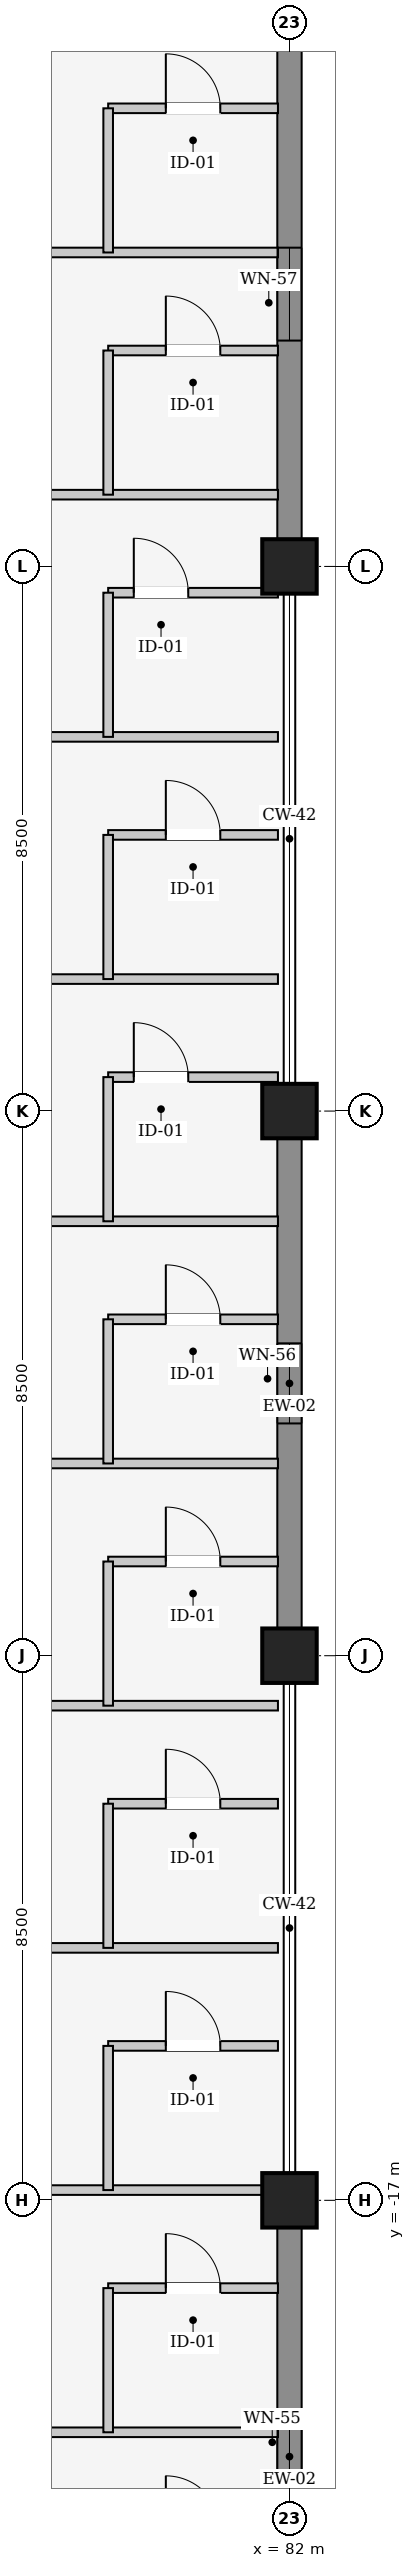
"""IFC4 building model, lengths in metres.
Left out: names, types, materials, properties, quantities, classifications, styles, units other than length and angle.
Written with IfcOpenShell. Run it as: python <this file> out.ifc"""

import sys

from ifc_helpers import new_model, si_unit, direction, frame, frame_2d, origin, origin_2d, place, context, subcontext, project, spatial, rectangle, extrude, element, fill, save


model = new_model("IFC4")
c1 = context("Model", 3, precision=1e-05, world=origin(), true_north=direction((0.0, 1.0)))
c2 = subcontext(c1, "Body", "Model", "MODEL_VIEW")
j1 = project(units=[si_unit("LENGTHUNIT", "METRE"), si_unit("PLANEANGLEUNIT", "RADIAN")], contexts=[c1])
p1 = place(None, origin())
s1 = spatial("IfcSite", under=j1, at=p1, CompositionType="ELEMENT")
p2 = place(p1, origin())
s2 = spatial("IfcBuilding", under=s1, at=p2, CompositionType="ELEMENT")
p3 = place(p2, frame((0.0, 0.0, 16.2)))
s3 = spatial("IfcBuildingStorey", under=s2, at=p3, CompositionType="ELEMENT", Elevation=16.2)
for number, where, z_axis, x_axis in (
    (1, (82.0, -17.0, 0.0), (0.0, 0.0, 1.0), (1.0, 0.0, 0.0)),
    (2, (82.0, -8.5, 0.0), (0.0, 0.0, 1.0), (1.0, 0.0, 0.0)),
    (3, (82.0, 0.0, 0.0), (0.0, 0.0, 1.0), (1.0, 0.0, 0.0)),
    (4, (82.0, 8.5, 0.0), (0.0, 0.0, 1.0), (1.0, 0.0, 0.0)),
):
    element("IfcColumn", number, at=place(p3, frame(where, z_axis=z_axis, x_axis=x_axis)), inside=s3, PredefinedType="COLUMN", context=c2, shape_type="SweptSolid", body=[
        extrude(rectangle(XDim=0.85, YDim=0.85, at=origin_2d()), origin(), (0.0, 0.0, 1.0), 4.8),
    ])
p4 = place(p3, frame((82.0, -17.407, 0.0), z_axis=(0.0, 0.0, 1.0), x_axis=(0.0, -1.0, 0.0)))
e5 = element("IfcWall", 5, at=p4, inside=s3, PredefinedType="SOLIDWALL", context=c2, shape_type="SweptSolid", body=[
    extrude(rectangle(XDim=7.186, YDim=0.38, at=frame_2d((3.593, 0.0))), origin(), (0.0, 0.0, 1.0), 3.76),
])
p5 = place(p4, frame((3.068, 0.0, 0.9)))
e6 = element("IfcOpeningElement", 6, at=p5, cuts=e5, PredefinedType="OPENING", context=c2, shape_type="SweptSolid", body=[
    extrude(rectangle(XDim=1.05, YDim=2.8, at=frame_2d((0.525, 1.4))), frame((0.0, 0.2, 0.0), z_axis=(0.0, -1.0, 0.0), x_axis=(1.0, 0.0, 0.0)), (0.0, 0.0, 1.0), 0.4),
])
p6 = place(p3, frame((82.0, -0.407, 0.0), z_axis=(0.0, 0.0, 1.0), x_axis=(0.0, -1.0, 0.0)))
e7 = element("IfcWall", 7, at=p6, inside=s3, PredefinedType="SOLIDWALL", context=c2, shape_type="SweptSolid", body=[
    extrude(rectangle(XDim=7.686, YDim=0.38, at=frame_2d((3.843, 0.0))), origin(), (0.0, 0.0, 1.0), 3.76),
])
p7 = place(p6, frame((3.218, 0.0, 0.9)))
e8 = element("IfcOpeningElement", 8, at=p7, cuts=e7, PredefinedType="OPENING", context=c2, shape_type="SweptSolid", body=[
    extrude(rectangle(XDim=1.25, YDim=2.8, at=frame_2d((0.625, 1.4))), frame((0.0, 0.2, 0.0), z_axis=(0.0, -1.0, 0.0), x_axis=(1.0, 0.0, 0.0)), (0.0, 0.0, 1.0), 0.4),
])
p8 = place(p3, frame((82.0, 16.593, 0.0), z_axis=(0.0, 0.0, 1.0), x_axis=(0.0, -1.0, 0.0)))
e9 = element("IfcWall", 9, at=p8, inside=s3, PredefinedType="SOLIDWALL", context=c2, shape_type="SweptSolid", body=[
    extrude(rectangle(XDim=7.686, YDim=0.38, at=frame_2d((3.843, 0.0))), origin(), (0.0, 0.0, 1.0), 3.76),
])
p9 = place(p8, frame((3.118, 0.0, 0.9)))
e10 = element("IfcOpeningElement", 10, at=p9, cuts=e9, PredefinedType="OPENING", context=c2, shape_type="SweptSolid", body=[
    extrude(rectangle(XDim=1.45, YDim=2.8, at=frame_2d((0.725, 1.4))), frame((0.0, 0.2, 0.0), z_axis=(0.0, -1.0, 0.0), x_axis=(1.0, 0.0, 0.0)), (0.0, 0.0, 1.0), 0.4),
])
p10 = place(p3, frame((70.2, -20.62, 0.0), z_axis=(0.0, 0.0, 1.0), x_axis=(1.0, 0.0, 0.0)))
e11 = element("IfcWall", 11, at=p10, inside=s3, PredefinedType="PARTITIONING", context=c2, shape_type="SweptSolid", body=[
    extrude(rectangle(XDim=11.62, YDim=0.15, at=frame_2d((5.81, 0.0))), origin(), (0.0, 0.0, 1.0), 3.845),
])
p11 = place(p3, frame((79.17, -18.37, 0.0), z_axis=(0.0, 0.0, 1.0), x_axis=(1.0, 0.0, 0.0)))
e12 = element("IfcWall", 12, at=p11, inside=s3, PredefinedType="PARTITIONING", context=c2, shape_type="SweptSolid", body=[
    extrude(rectangle(XDim=2.65, YDim=0.15, at=frame_2d((1.325, 0.0))), origin(), (0.0, 0.0, 1.0), 3.845),
])
p12 = place(p11, frame((0.9, 0.0, 0.0)))
e13 = element("IfcOpeningElement", 13, at=p12, cuts=e12, PredefinedType="OPENING", context=c2, shape_type="SweptSolid", body=[
    extrude(rectangle(XDim=0.85, YDim=2.15, at=frame_2d((0.425, 1.075))), frame((0.0, 0.085, 0.0), z_axis=(0.0, -1.0, 0.0), x_axis=(1.0, 0.0, 0.0)), (0.0, 0.0, 1.0), 0.17),
])
p13 = place(p3, frame((79.17, -20.62, 0.0), z_axis=(0.0, 0.0, 1.0), x_axis=(0.0, 1.0, 0.0)))
e14 = element("IfcWall", 14, at=p13, inside=s3, PredefinedType="PARTITIONING", context=c2, shape_type="SweptSolid", body=[
    extrude(rectangle(XDim=2.25, YDim=0.15, at=frame_2d((1.125, 0.0))), origin(), (0.0, 0.0, 1.0), 4.44),
])
p14 = place(p3, frame((70.2, -16.84, 0.0), z_axis=(0.0, 0.0, 1.0), x_axis=(1.0, 0.0, 0.0)))
e15 = element("IfcWall", 15, at=p14, inside=s3, PredefinedType="PARTITIONING", context=c2, shape_type="SweptSolid", body=[
    extrude(rectangle(XDim=11.62, YDim=0.15, at=frame_2d((5.81, 0.0))), origin(), (0.0, 0.0, 1.0), 3.545),
])
p15 = place(p3, frame((79.17, -14.59, 0.0), z_axis=(0.0, 0.0, 1.0), x_axis=(1.0, 0.0, 0.0)))
e16 = element("IfcWall", 16, at=p15, inside=s3, PredefinedType="PARTITIONING", context=c2, shape_type="SweptSolid", body=[
    extrude(rectangle(XDim=2.65, YDim=0.15, at=frame_2d((1.325, 0.0))), origin(), (0.0, 0.0, 1.0), 3.845),
])
p16 = place(p15, frame((0.9, 0.0, 0.0)))
e17 = element("IfcOpeningElement", 17, at=p16, cuts=e16, PredefinedType="OPENING", context=c2, shape_type="SweptSolid", body=[
    extrude(rectangle(XDim=0.85, YDim=2.15, at=frame_2d((0.425, 1.075))), frame((0.0, 0.085, 0.0), z_axis=(0.0, -1.0, 0.0), x_axis=(1.0, 0.0, 0.0)), (0.0, 0.0, 1.0), 0.17),
])
p17 = place(p3, frame((79.17, -16.84, 0.0), z_axis=(0.0, 0.0, 1.0), x_axis=(0.0, 1.0, 0.0)))
e18 = element("IfcWall", 18, at=p17, inside=s3, PredefinedType="PARTITIONING", context=c2, shape_type="SweptSolid", body=[
    extrude(rectangle(XDim=2.25, YDim=0.15, at=frame_2d((1.125, 0.0))), origin(), (0.0, 0.0, 1.0), 3.745),
])
p18 = place(p3, frame((70.2, -13.06, 0.0), z_axis=(0.0, 0.0, 1.0), x_axis=(1.0, 0.0, 0.0)))
e19 = element("IfcWall", 19, at=p18, inside=s3, PredefinedType="PARTITIONING", context=c2, shape_type="SweptSolid", body=[
    extrude(rectangle(XDim=11.62, YDim=0.15, at=frame_2d((5.81, 0.0))), origin(), (0.0, 0.0, 1.0), 3.845),
])
p19 = place(p3, frame((79.17, -10.81, 0.0), z_axis=(0.0, 0.0, 1.0), x_axis=(1.0, 0.0, 0.0)))
e20 = element("IfcWall", 20, at=p19, inside=s3, PredefinedType="PARTITIONING", context=c2, shape_type="SweptSolid", body=[
    extrude(rectangle(XDim=2.65, YDim=0.15, at=frame_2d((1.325, 0.0))), origin(), (0.0, 0.0, 1.0), 3.845),
])
p20 = place(p19, frame((0.9, 0.0, 0.0)))
e21 = element("IfcOpeningElement", 21, at=p20, cuts=e20, PredefinedType="OPENING", context=c2, shape_type="SweptSolid", body=[
    extrude(rectangle(XDim=0.85, YDim=2.15, at=frame_2d((0.425, 1.075))), frame((0.0, 0.085, 0.0), z_axis=(0.0, -1.0, 0.0), x_axis=(1.0, 0.0, 0.0)), (0.0, 0.0, 1.0), 0.17),
])
p21 = place(p3, frame((79.17, -13.06, 0.0), z_axis=(0.0, 0.0, 1.0), x_axis=(0.0, 1.0, 0.0)))
e22 = element("IfcWall", 22, at=p21, inside=s3, PredefinedType="PARTITIONING", context=c2, shape_type="SweptSolid", body=[
    extrude(rectangle(XDim=2.25, YDim=0.15, at=frame_2d((1.125, 0.0))), origin(), (0.0, 0.0, 1.0), 4.182),
])
p22 = place(p3, frame((70.2, -9.28, 0.0), z_axis=(0.0, 0.0, 1.0), x_axis=(1.0, 0.0, 0.0)))
e23 = element("IfcWall", 23, at=p22, inside=s3, PredefinedType="PARTITIONING", context=c2, shape_type="SweptSolid", body=[
    extrude(rectangle(XDim=11.62, YDim=0.15, at=frame_2d((5.81, 0.0))), origin(), (0.0, 0.0, 1.0), 3.845),
])
p23 = place(p3, frame((79.17, -7.03, 0.0), z_axis=(0.0, 0.0, 1.0), x_axis=(1.0, 0.0, 0.0)))
e24 = element("IfcWall", 24, at=p23, inside=s3, PredefinedType="PARTITIONING", context=c2, shape_type="SweptSolid", body=[
    extrude(rectangle(XDim=2.65, YDim=0.15, at=frame_2d((1.325, 0.0))), origin(), (0.0, 0.0, 1.0), 3.845),
])
p24 = place(p23, frame((0.9, 0.0, 0.0)))
e25 = element("IfcOpeningElement", 25, at=p24, cuts=e24, PredefinedType="OPENING", context=c2, shape_type="SweptSolid", body=[
    extrude(rectangle(XDim=0.85, YDim=2.15, at=frame_2d((0.425, 1.075))), frame((0.0, 0.085, 0.0), z_axis=(0.0, -1.0, 0.0), x_axis=(1.0, 0.0, 0.0)), (0.0, 0.0, 1.0), 0.17),
])
p25 = place(p3, frame((79.17, -9.28, 0.0), z_axis=(0.0, 0.0, 1.0), x_axis=(0.0, 1.0, 0.0)))
e26 = element("IfcWall", 26, at=p25, inside=s3, PredefinedType="PARTITIONING", context=c2, shape_type="SweptSolid", body=[
    extrude(rectangle(XDim=2.25, YDim=0.15, at=frame_2d((1.125, 0.0))), origin(), (0.0, 0.0, 1.0), 3.745),
])
p26 = place(p3, frame((70.2, -5.5, 0.0), z_axis=(0.0, 0.0, 1.0), x_axis=(1.0, 0.0, 0.0)))
e27 = element("IfcWall", 27, at=p26, inside=s3, PredefinedType="PARTITIONING", context=c2, shape_type="SweptSolid", body=[
    extrude(rectangle(XDim=11.62, YDim=0.15, at=frame_2d((5.81, 0.0))), origin(), (0.0, 0.0, 1.0), 3.845),
])
p27 = place(p3, frame((79.17, -3.25, 0.0), z_axis=(0.0, 0.0, 1.0), x_axis=(1.0, 0.0, 0.0)))
e28 = element("IfcWall", 28, at=p27, inside=s3, PredefinedType="PARTITIONING", context=c2, shape_type="SweptSolid", body=[
    extrude(rectangle(XDim=2.65, YDim=0.15, at=frame_2d((1.325, 0.0))), origin(), (0.0, 0.0, 1.0), 3.845),
])
p28 = place(p27, frame((0.9, 0.0, 0.0)))
e29 = element("IfcOpeningElement", 29, at=p28, cuts=e28, PredefinedType="OPENING", context=c2, shape_type="SweptSolid", body=[
    extrude(rectangle(XDim=0.85, YDim=2.15, at=frame_2d((0.425, 1.075))), frame((0.0, 0.085, 0.0), z_axis=(0.0, -1.0, 0.0), x_axis=(1.0, 0.0, 0.0)), (0.0, 0.0, 1.0), 0.17),
])
p29 = place(p3, frame((79.17, -5.5, 0.0), z_axis=(0.0, 0.0, 1.0), x_axis=(0.0, 1.0, 0.0)))
e30 = element("IfcWall", 30, at=p29, inside=s3, PredefinedType="PARTITIONING", context=c2, shape_type="SweptSolid", body=[
    extrude(rectangle(XDim=2.25, YDim=0.15, at=frame_2d((1.125, 0.0))), origin(), (0.0, 0.0, 1.0), 4.182),
])
p30 = place(p3, frame((70.2, -1.72, 0.0), z_axis=(0.0, 0.0, 1.0), x_axis=(1.0, 0.0, 0.0)))
e31 = element("IfcWall", 31, at=p30, inside=s3, PredefinedType="PARTITIONING", context=c2, shape_type="SweptSolid", body=[
    extrude(rectangle(XDim=11.62, YDim=0.15, at=frame_2d((5.81, 0.0))), origin(), (0.0, 0.0, 1.0), 3.845),
])
p31 = place(p3, frame((79.17, 0.53, 0.0), z_axis=(0.0, 0.0, 1.0), x_axis=(1.0, 0.0, 0.0)))
e32 = element("IfcWall", 32, at=p31, inside=s3, PredefinedType="PARTITIONING", context=c2, shape_type="SweptSolid", body=[
    extrude(rectangle(XDim=2.65, YDim=0.15, at=frame_2d((1.325, 0.0))), origin(), (0.0, 0.0, 1.0), 3.845),
])
p32 = place(p31, frame((0.4, 0.0, 0.0)))
e33 = element("IfcOpeningElement", 33, at=p32, cuts=e32, PredefinedType="OPENING", context=c2, shape_type="SweptSolid", body=[
    extrude(rectangle(XDim=0.85, YDim=2.15, at=frame_2d((0.425, 1.075))), frame((0.0, 0.085, 0.0), z_axis=(0.0, -1.0, 0.0), x_axis=(1.0, 0.0, 0.0)), (0.0, 0.0, 1.0), 0.17),
])
p33 = place(p3, frame((79.17, -1.72, 0.0), z_axis=(0.0, 0.0, 1.0), x_axis=(0.0, 1.0, 0.0)))
e34 = element("IfcWall", 34, at=p33, inside=s3, PredefinedType="PARTITIONING", context=c2, shape_type="SweptSolid", body=[
    extrude(rectangle(XDim=2.25, YDim=0.15, at=frame_2d((1.125, 0.0))), origin(), (0.0, 0.0, 1.0), 3.745),
])
p34 = place(p3, frame((70.2, 2.06, 0.0), z_axis=(0.0, 0.0, 1.0), x_axis=(1.0, 0.0, 0.0)))
e35 = element("IfcWall", 35, at=p34, inside=s3, PredefinedType="PARTITIONING", context=c2, shape_type="SweptSolid", body=[
    extrude(rectangle(XDim=11.62, YDim=0.15, at=frame_2d((5.81, 0.0))), origin(), (0.0, 0.0, 1.0), 3.845),
])
p35 = place(p3, frame((79.17, 4.31, 0.0), z_axis=(0.0, 0.0, 1.0), x_axis=(1.0, 0.0, 0.0)))
e36 = element("IfcWall", 36, at=p35, inside=s3, PredefinedType="PARTITIONING", context=c2, shape_type="SweptSolid", body=[
    extrude(rectangle(XDim=2.65, YDim=0.15, at=frame_2d((1.325, 0.0))), origin(), (0.0, 0.0, 1.0), 3.845),
])
p36 = place(p35, frame((0.9, 0.0, 0.0)))
e37 = element("IfcOpeningElement", 37, at=p36, cuts=e36, PredefinedType="OPENING", context=c2, shape_type="SweptSolid", body=[
    extrude(rectangle(XDim=0.85, YDim=2.15, at=frame_2d((0.425, 1.075))), frame((0.0, 0.085, 0.0), z_axis=(0.0, -1.0, 0.0), x_axis=(1.0, 0.0, 0.0)), (0.0, 0.0, 1.0), 0.17),
])
p37 = place(p3, frame((79.17, 2.06, 0.0), z_axis=(0.0, 0.0, 1.0), x_axis=(0.0, 1.0, 0.0)))
e38 = element("IfcWall", 38, at=p37, inside=s3, PredefinedType="PARTITIONING", context=c2, shape_type="SweptSolid", body=[
    extrude(rectangle(XDim=2.25, YDim=0.15, at=frame_2d((1.125, 0.0))), origin(), (0.0, 0.0, 1.0), 4.182),
])
p38 = place(p3, frame((70.2, 5.84, 0.0), z_axis=(0.0, 0.0, 1.0), x_axis=(1.0, 0.0, 0.0)))
e39 = element("IfcWall", 39, at=p38, inside=s3, PredefinedType="PARTITIONING", context=c2, shape_type="SweptSolid", body=[
    extrude(rectangle(XDim=11.62, YDim=0.15, at=frame_2d((5.81, 0.0))), origin(), (0.0, 0.0, 1.0), 3.845),
])
p39 = place(p3, frame((79.17, 8.09, 0.0), z_axis=(0.0, 0.0, 1.0), x_axis=(1.0, 0.0, 0.0)))
e40 = element("IfcWall", 40, at=p39, inside=s3, PredefinedType="PARTITIONING", context=c2, shape_type="SweptSolid", body=[
    extrude(rectangle(XDim=2.65, YDim=0.15, at=frame_2d((1.325, 0.0))), origin(), (0.0, 0.0, 1.0), 3.745),
])
p40 = place(p39, frame((0.4, 0.0, 0.0)))
e41 = element("IfcOpeningElement", 41, at=p40, cuts=e40, PredefinedType="OPENING", context=c2, shape_type="SweptSolid", body=[
    extrude(rectangle(XDim=0.85, YDim=2.15, at=frame_2d((0.425, 1.075))), frame((0.0, 0.085, 0.0), z_axis=(0.0, -1.0, 0.0), x_axis=(1.0, 0.0, 0.0)), (0.0, 0.0, 1.0), 0.17),
])
p41 = place(p3, frame((79.17, 5.84, 0.0), z_axis=(0.0, 0.0, 1.0), x_axis=(0.0, 1.0, 0.0)))
e42 = element("IfcWall", 42, at=p41, inside=s3, PredefinedType="PARTITIONING", context=c2, shape_type="SweptSolid", body=[
    extrude(rectangle(XDim=2.25, YDim=0.15, at=frame_2d((1.125, 0.0))), origin(), (0.0, 0.0, 1.0), 3.745),
])
p42 = place(p3, frame((70.2, 9.62, 0.0), z_axis=(0.0, 0.0, 1.0), x_axis=(1.0, 0.0, 0.0)))
e43 = element("IfcWall", 43, at=p42, inside=s3, PredefinedType="PARTITIONING", context=c2, shape_type="SweptSolid", body=[
    extrude(rectangle(XDim=11.62, YDim=0.15, at=frame_2d((5.81, 0.0))), origin(), (0.0, 0.0, 1.0), 3.845),
])
p43 = place(p3, frame((79.17, 11.87, 0.0), z_axis=(0.0, 0.0, 1.0), x_axis=(1.0, 0.0, 0.0)))
e44 = element("IfcWall", 44, at=p43, inside=s3, PredefinedType="PARTITIONING", context=c2, shape_type="SweptSolid", body=[
    extrude(rectangle(XDim=2.65, YDim=0.15, at=frame_2d((1.325, 0.0))), origin(), (0.0, 0.0, 1.0), 3.845),
])
p44 = place(p43, frame((0.9, 0.0, 0.0)))
e45 = element("IfcOpeningElement", 45, at=p44, cuts=e44, PredefinedType="OPENING", context=c2, shape_type="SweptSolid", body=[
    extrude(rectangle(XDim=0.85, YDim=2.15, at=frame_2d((0.425, 1.075))), frame((0.0, 0.085, 0.0), z_axis=(0.0, -1.0, 0.0), x_axis=(1.0, 0.0, 0.0)), (0.0, 0.0, 1.0), 0.17),
])
p45 = place(p3, frame((79.17, 9.62, 0.0), z_axis=(0.0, 0.0, 1.0), x_axis=(0.0, 1.0, 0.0)))
e46 = element("IfcWall", 46, at=p45, inside=s3, PredefinedType="PARTITIONING", context=c2, shape_type="SweptSolid", body=[
    extrude(rectangle(XDim=2.25, YDim=0.15, at=frame_2d((1.125, 0.0))), origin(), (0.0, 0.0, 1.0), 4.44),
])
p46 = place(p3, frame((70.2, 13.4, 0.0), z_axis=(0.0, 0.0, 1.0), x_axis=(1.0, 0.0, 0.0)))
e47 = element("IfcWall", 47, at=p46, inside=s3, PredefinedType="PARTITIONING", context=c2, shape_type="SweptSolid", body=[
    extrude(rectangle(XDim=11.62, YDim=0.15, at=frame_2d((5.81, 0.0))), origin(), (0.0, 0.0, 1.0), 3.845),
])
p47 = place(p3, frame((79.17, 15.65, 0.0), z_axis=(0.0, 0.0, 1.0), x_axis=(1.0, 0.0, 0.0)))
e48 = element("IfcWall", 48, at=p47, inside=s3, PredefinedType="PARTITIONING", context=c2, shape_type="SweptSolid", body=[
    extrude(rectangle(XDim=2.65, YDim=0.15, at=frame_2d((1.325, 0.0))), origin(), (0.0, 0.0, 1.0), 3.845),
])
p48 = place(p47, frame((0.9, 0.0, 0.0)))
e49 = element("IfcOpeningElement", 49, at=p48, cuts=e48, PredefinedType="OPENING", context=c2, shape_type="SweptSolid", body=[
    extrude(rectangle(XDim=0.85, YDim=2.15, at=frame_2d((0.425, 1.075))), frame((0.0, 0.085, 0.0), z_axis=(0.0, -1.0, 0.0), x_axis=(1.0, 0.0, 0.0)), (0.0, 0.0, 1.0), 0.17),
])
p49 = place(p3, frame((79.17, 13.4, 0.0), z_axis=(0.0, 0.0, 1.0), x_axis=(0.0, 1.0, 0.0)))
e50 = element("IfcWall", 50, at=p49, inside=s3, PredefinedType="PARTITIONING", context=c2, shape_type="SweptSolid", body=[
    extrude(rectangle(XDim=2.25, YDim=0.15, at=frame_2d((1.125, 0.0))), origin(), (0.0, 0.0, 1.0), 4.44),
])
p50 = place(p5, origin())
e51 = element("IfcWindow", 51, at=p50, inside=s3, PartitioningType="SINGLE_PANEL", PredefinedType="WINDOW", context=c2, shape_type="SweptSolid", body=[
    extrude(rectangle(XDim=1.05, YDim=2.8, at=frame_2d((0.525, 1.4))), frame((0.0, 0.03, 0.0), z_axis=(0.0, -1.0, 0.0), x_axis=(1.0, 0.0, 0.0)), (0.0, 0.0, 1.0), 0.06),
])
fill(e6, e51)
p51 = place(p7, origin())
e52 = element("IfcWindow", 52, at=p51, inside=s3, PartitioningType="SINGLE_PANEL", PredefinedType="WINDOW", context=c2, shape_type="SweptSolid", body=[
    extrude(rectangle(XDim=1.25, YDim=2.8, at=frame_2d((0.625, 1.4))), frame((0.0, 0.03, 0.0), z_axis=(0.0, -1.0, 0.0), x_axis=(1.0, 0.0, 0.0)), (0.0, 0.0, 1.0), 0.06),
])
fill(e8, e52)
p52 = place(p9, origin())
e53 = element("IfcWindow", 53, at=p52, inside=s3, PartitioningType="SINGLE_PANEL", PredefinedType="WINDOW", context=c2, shape_type="SweptSolid", body=[
    extrude(rectangle(XDim=1.45, YDim=2.8, at=frame_2d((0.725, 1.4))), frame((0.0, 0.03, 0.0), z_axis=(0.0, -1.0, 0.0), x_axis=(1.0, 0.0, 0.0)), (0.0, 0.0, 1.0), 0.06),
])
fill(e10, e53)
p53 = place(p12, origin())
e54 = element("IfcDoor", 54, at=p53, inside=s3, OperationType="SINGLE_SWING_LEFT", PredefinedType="DOOR", context=c2, shape_type="SweptSolid", body=[
    extrude(rectangle(XDim=0.85, YDim=2.15, at=frame_2d((0.425, 1.075))), frame((0.0, 0.025, 0.0), z_axis=(0.0, -1.0, 0.0), x_axis=(1.0, 0.0, 0.0)), (0.0, 0.0, 1.0), 0.05),
])
fill(e13, e54)
p54 = place(p16, origin())
e55 = element("IfcDoor", 55, at=p54, inside=s3, OperationType="SINGLE_SWING_LEFT", PredefinedType="DOOR", context=c2, shape_type="SweptSolid", body=[
    extrude(rectangle(XDim=0.85, YDim=2.15, at=frame_2d((0.425, 1.075))), frame((0.0, 0.025, 0.0), z_axis=(0.0, -1.0, 0.0), x_axis=(1.0, 0.0, 0.0)), (0.0, 0.0, 1.0), 0.05),
])
fill(e17, e55)
p55 = place(p20, origin())
e56 = element("IfcDoor", 56, at=p55, inside=s3, OperationType="SINGLE_SWING_LEFT", PredefinedType="DOOR", context=c2, shape_type="SweptSolid", body=[
    extrude(rectangle(XDim=0.85, YDim=2.15, at=frame_2d((0.425, 1.075))), frame((0.0, 0.025, 0.0), z_axis=(0.0, -1.0, 0.0), x_axis=(1.0, 0.0, 0.0)), (0.0, 0.0, 1.0), 0.05),
])
fill(e21, e56)
p56 = place(p24, origin())
e57 = element("IfcDoor", 57, at=p56, inside=s3, OperationType="SINGLE_SWING_LEFT", PredefinedType="DOOR", context=c2, shape_type="SweptSolid", body=[
    extrude(rectangle(XDim=0.85, YDim=2.15, at=frame_2d((0.425, 1.075))), frame((0.0, 0.025, 0.0), z_axis=(0.0, -1.0, 0.0), x_axis=(1.0, 0.0, 0.0)), (0.0, 0.0, 1.0), 0.05),
])
fill(e25, e57)
p57 = place(p28, origin())
e58 = element("IfcDoor", 58, at=p57, inside=s3, OperationType="SINGLE_SWING_LEFT", PredefinedType="DOOR", context=c2, shape_type="SweptSolid", body=[
    extrude(rectangle(XDim=0.85, YDim=2.15, at=frame_2d((0.425, 1.075))), frame((0.0, 0.025, 0.0), z_axis=(0.0, -1.0, 0.0), x_axis=(1.0, 0.0, 0.0)), (0.0, 0.0, 1.0), 0.05),
])
fill(e29, e58)
p58 = place(p32, origin())
e59 = element("IfcDoor", 59, at=p58, inside=s3, OperationType="SINGLE_SWING_LEFT", PredefinedType="DOOR", context=c2, shape_type="SweptSolid", body=[
    extrude(rectangle(XDim=0.85, YDim=2.15, at=frame_2d((0.425, 1.075))), frame((0.0, 0.025, 0.0), z_axis=(0.0, -1.0, 0.0), x_axis=(1.0, 0.0, 0.0)), (0.0, 0.0, 1.0), 0.05),
])
fill(e33, e59)
p59 = place(p36, origin())
e60 = element("IfcDoor", 60, at=p59, inside=s3, OperationType="SINGLE_SWING_LEFT", PredefinedType="DOOR", context=c2, shape_type="SweptSolid", body=[
    extrude(rectangle(XDim=0.85, YDim=2.15, at=frame_2d((0.425, 1.075))), frame((0.0, 0.025, 0.0), z_axis=(0.0, -1.0, 0.0), x_axis=(1.0, 0.0, 0.0)), (0.0, 0.0, 1.0), 0.05),
])
fill(e37, e60)
p60 = place(p40, origin())
e61 = element("IfcDoor", 61, at=p60, inside=s3, OperationType="SINGLE_SWING_LEFT", PredefinedType="DOOR", context=c2, shape_type="SweptSolid", body=[
    extrude(rectangle(XDim=0.85, YDim=2.15, at=frame_2d((0.425, 1.075))), frame((0.0, 0.025, 0.0), z_axis=(0.0, -1.0, 0.0), x_axis=(1.0, 0.0, 0.0)), (0.0, 0.0, 1.0), 0.05),
])
fill(e41, e61)
p61 = place(p44, origin())
e62 = element("IfcDoor", 62, at=p61, inside=s3, OperationType="SINGLE_SWING_LEFT", PredefinedType="DOOR", context=c2, shape_type="SweptSolid", body=[
    extrude(rectangle(XDim=0.85, YDim=2.15, at=frame_2d((0.425, 1.075))), frame((0.0, 0.025, 0.0), z_axis=(0.0, -1.0, 0.0), x_axis=(1.0, 0.0, 0.0)), (0.0, 0.0, 1.0), 0.05),
])
fill(e45, e62)
p62 = place(p48, origin())
e63 = element("IfcDoor", 63, at=p62, inside=s3, OperationType="SINGLE_SWING_LEFT", PredefinedType="DOOR", context=c2, shape_type="SweptSolid", body=[
    extrude(rectangle(XDim=0.85, YDim=2.15, at=frame_2d((0.425, 1.075))), frame((0.0, 0.025, 0.0), z_axis=(0.0, -1.0, 0.0), x_axis=(1.0, 0.0, 0.0)), (0.0, 0.0, 1.0), 0.05),
])
fill(e49, e63)
save(model, sys.argv[1])
